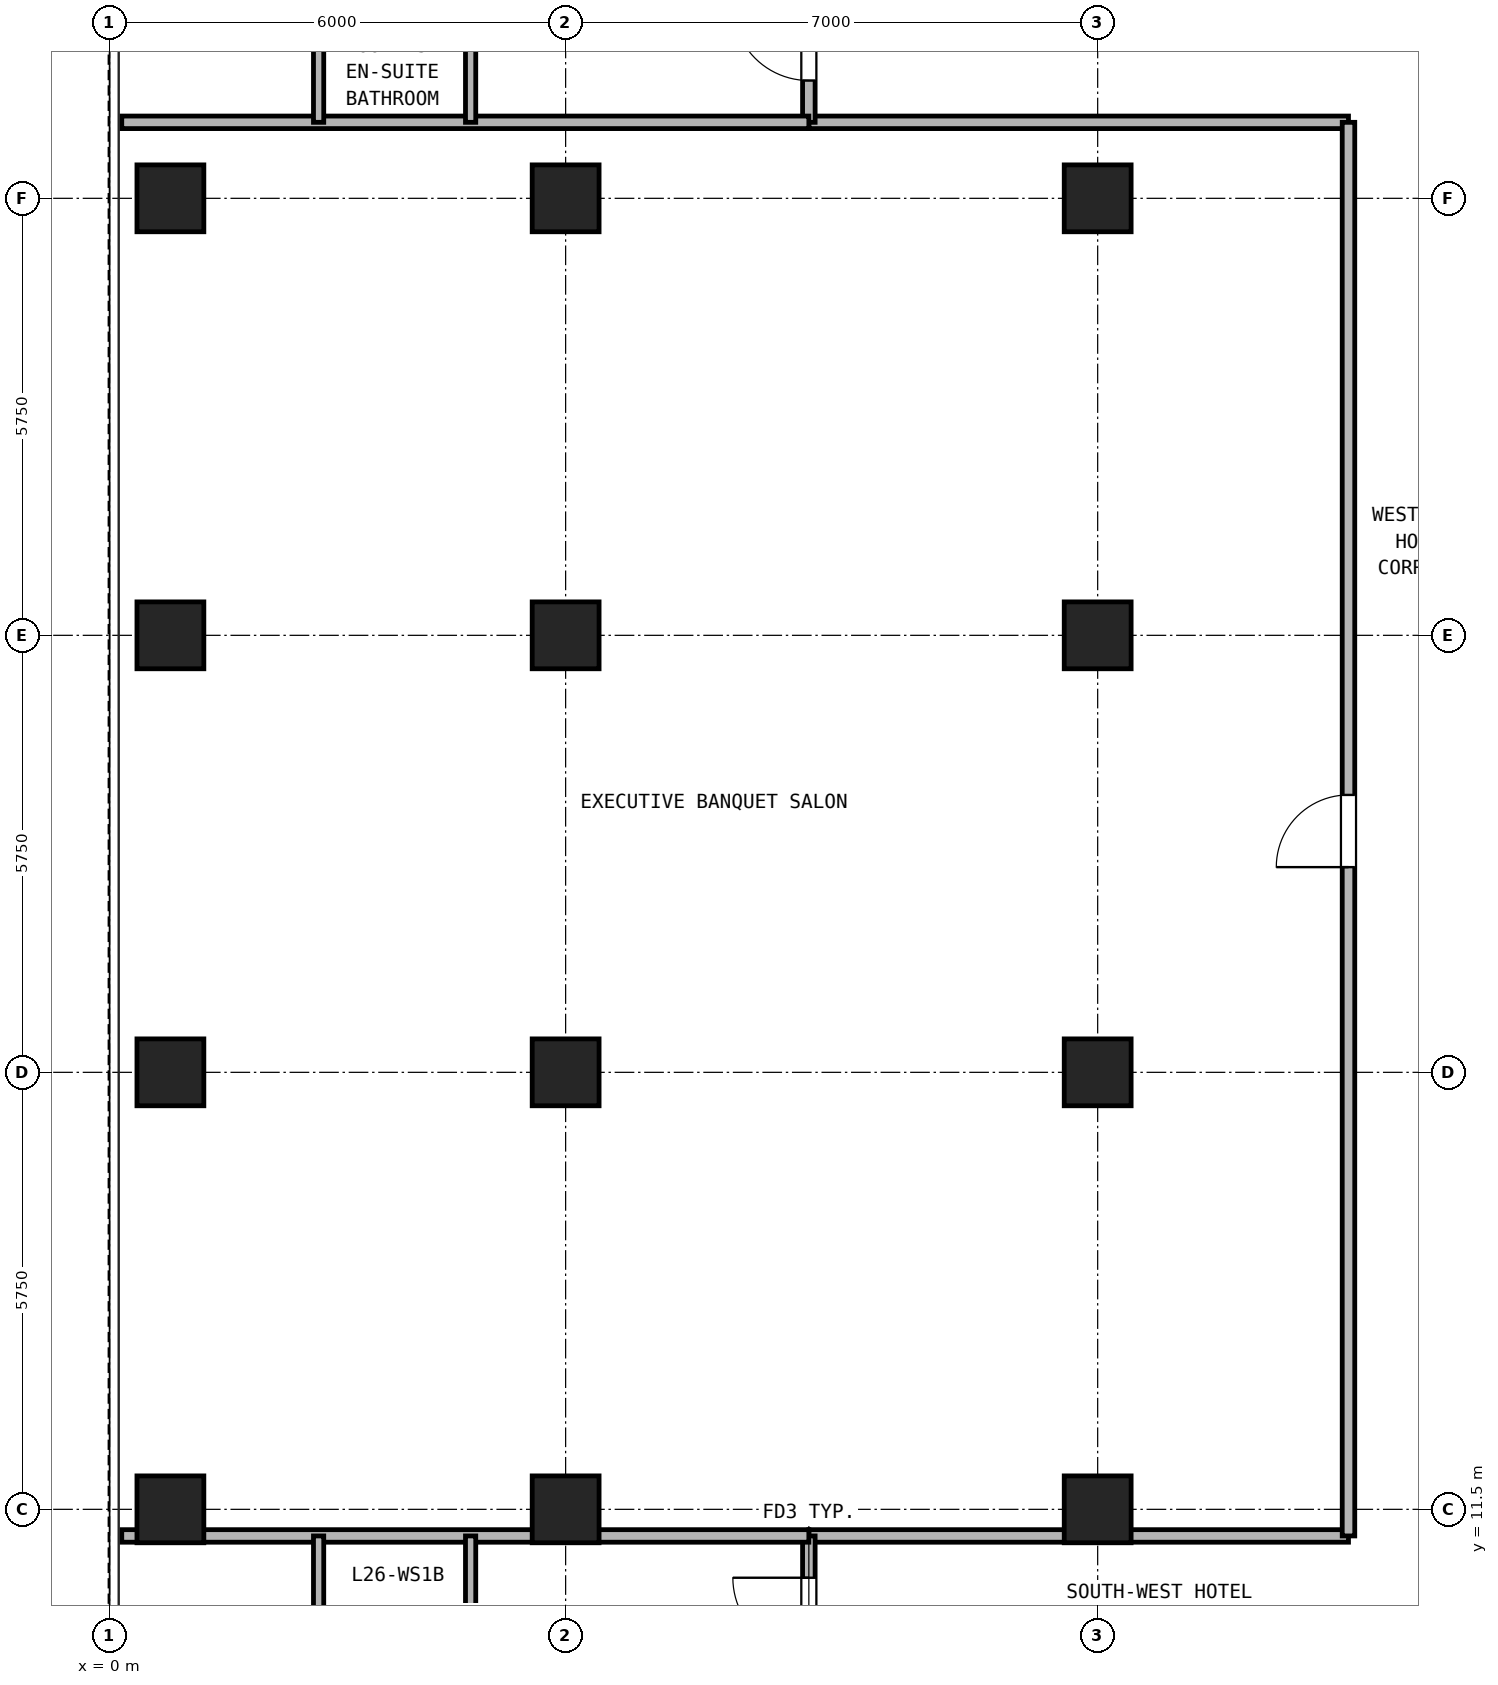
"""IFC4 building model, lengths in metres.
Left out: names, types, materials, properties, quantities, classifications, styles, units other than length and angle.
Written with IfcOpenShell. Run it as: python <this file> out.ifc"""

import sys

from ifc_helpers import new_model, si_unit, direction, frame, frame_2d, origin, origin_2d, place, context, subcontext, project, spatial, rectangle, hollow_rectangle, extrude, source, transform, mapped, element, fill, save


model = new_model("IFC4")
c1 = context("Model", 3, precision=1e-05, world=origin(), true_north=direction((0.0, 1.0)))
c2 = subcontext(c1, "Body", "Model", "MODEL_VIEW")
j1 = project(units=[si_unit("LENGTHUNIT", "METRE"), si_unit("PLANEANGLEUNIT", "RADIAN")], contexts=[c1])
p1 = place(None, origin())
s1 = spatial("IfcSite", under=j1, at=p1, CompositionType="ELEMENT")
p2 = place(p1, origin())
s2 = spatial("IfcBuilding", under=s1, at=p2, CompositionType="ELEMENT")
p3 = place(p2, frame((0.0, 0.0, 99.1)))
s3 = spatial("IfcBuildingStorey", under=s2, at=p3, CompositionType="ELEMENT", Elevation=99.1)
m1 = source(origin(), c2, "Body", "SweptSolid", [
    extrude(hollow_rectangle(XDim=0.88, YDim=0.88, WallThickness=0.05, at=origin_2d()), origin(), (0.0, 0.0, 1.0), 2.95),
])
for number, where, z_axis, x_axis in (
    (1, (0.8, 11.5, 0.0), (0.0, 0.0, 1.0), (1.0, 0.0, 0.0)),
    (2, (0.8, 17.25, 0.0), (0.0, 0.0, 1.0), (1.0, 0.0, 0.0)),
    (3, (0.8, 23.0, 0.0), (0.0, 0.0, 1.0), (1.0, 0.0, 0.0)),
    (4, (0.8, 28.75, 0.0), (0.0, 0.0, 1.0), (1.0, 0.0, 0.0)),
    (5, (6.0, 11.5, 0.0), (0.0, 0.0, 1.0), (1.0, 0.0, 0.0)),
    (6, (6.0, 17.25, 0.0), (0.0, 0.0, 1.0), (1.0, 0.0, 0.0)),
    (7, (6.0, 23.0, 0.0), (0.0, 0.0, 1.0), (1.0, 0.0, 0.0)),
    (8, (6.0, 28.75, 0.0), (0.0, 0.0, 1.0), (1.0, 0.0, 0.0)),
    (9, (13.0, 11.5, 0.0), (0.0, 0.0, 1.0), (1.0, 0.0, 0.0)),
    (10, (13.0, 17.25, 0.0), (0.0, 0.0, 1.0), (1.0, 0.0, 0.0)),
    (11, (13.0, 23.0, 0.0), (0.0, 0.0, 1.0), (1.0, 0.0, 0.0)),
    (12, (13.0, 28.75, 0.0), (0.0, 0.0, 1.0), (1.0, 0.0, 0.0)),
):
    element("IfcColumn", number, at=place(p3, frame(where, z_axis=z_axis, x_axis=x_axis)), inside=s3, PredefinedType="COLUMN", context=c2, shape_type="MappedRepresentation", body=[
        mapped(m1, transform((0.0, 0.0, 0.0), x_axis=(1.0, 0.0, 0.0), y_axis=(0.0, 1.0, 0.0), z_axis=(0.0, 0.0, 1.0), scale=1.0)),
    ])
for number, where, z_axis, x_axis in (
    (13, (9.2, 11.15, 0.0), (0.0, 0.0, 1.0), (1.0, 0.0, 0.0)),
    (14, (9.2, 29.75, 0.0), (0.0, 0.0, 1.0), (1.0, 0.0, 0.0)),
):
    element("IfcWall", number, at=place(p3, frame(where, z_axis=z_axis, x_axis=x_axis)), inside=s3, PredefinedType="PARTITIONING", context=c2, shape_type="SweptSolid", body=[
        extrude(rectangle(XDim=7.1, YDim=0.165, at=frame_2d((3.55, 0.0))), origin(), (0.0, 0.0, 1.0), 2.95),
    ])
p4 = place(p3, frame((16.3, 11.15, 0.0), z_axis=(0.0, 0.0, 1.0), x_axis=(0.0, 1.0, 0.0)))
e15 = element("IfcWall", 15, at=p4, inside=s3, PredefinedType="PARTITIONING", context=c2, shape_type="SweptSolid", body=[
    extrude(rectangle(XDim=18.6, YDim=0.165, at=frame_2d((9.3, 0.0))), origin(), (0.0, 0.0, 1.0), 2.95),
])
p5 = place(p4, frame((8.8, 0.0, 0.0)))
e16 = element("IfcOpeningElement", 16, at=p5, cuts=e15, PredefinedType="OPENING", context=c2, shape_type="SweptSolid", body=[
    extrude(rectangle(XDim=0.95, YDim=2.15, at=frame_2d((0.475, 1.075))), frame((0.0, 0.093, 0.0), z_axis=(0.0, -1.0, 0.0), x_axis=(1.0, 0.0, 0.0)), (0.0, 0.0, 1.0), 0.185),
])
p6 = place(p3, frame((9.2, 0.16, 0.0), z_axis=(0.0, 0.0, 1.0), x_axis=(0.0, 1.0, 0.0)))
e17 = element("IfcWall", 17, at=p6, inside=s3, PredefinedType="PARTITIONING", context=c2, shape_type="SweptSolid", body=[
    extrude(rectangle(XDim=10.99, YDim=0.165, at=frame_2d((5.495, 0.0))), origin(), (0.0, 0.0, 1.0), 2.95),
])
p7 = place(p6, frame((9.44, 0.0, 0.0)))
e18 = element("IfcOpeningElement", 18, at=p7, cuts=e17, PredefinedType="OPENING", context=c2, shape_type="SweptSolid", body=[
    extrude(rectangle(XDim=1.0, YDim=2.15, at=frame_2d((0.5, 1.075))), frame((0.0, 0.093, 0.0), z_axis=(0.0, -1.0, 0.0), x_axis=(1.0, 0.0, 0.0)), (0.0, 0.0, 1.0), 0.185),
])
p8 = place(p3, frame((9.2, 29.75, 0.0), z_axis=(0.0, 0.0, 1.0), x_axis=(0.0, 1.0, 0.0)))
e19 = element("IfcWall", 19, at=p8, inside=s3, PredefinedType="PARTITIONING", context=c2, shape_type="SweptSolid", body=[
    extrude(rectangle(XDim=5.39, YDim=0.165, at=frame_2d((2.695, 0.0))), origin(), (0.0, 0.0, 1.0), 2.95),
])
p9 = place(p8, frame((0.55, 0.0, 0.0)))
e20 = element("IfcOpeningElement", 20, at=p9, cuts=e19, PredefinedType="OPENING", context=c2, shape_type="SweptSolid", body=[
    extrude(rectangle(XDim=1.0, YDim=2.15, at=frame_2d((0.5, 1.075))), frame((0.0, 0.093, 0.0), z_axis=(0.0, -1.0, 0.0), x_axis=(1.0, 0.0, 0.0)), (0.0, 0.0, 1.0), 0.185),
])
for number, where, z_axis, x_axis in (
    (21, (0.16, 11.15, 0.0), (0.0, 0.0, 1.0), (1.0, 0.0, 0.0)),
    (22, (0.16, 29.75, 0.0), (0.0, 0.0, 1.0), (1.0, 0.0, 0.0)),
):
    element("IfcWall", number, at=place(p3, frame(where, z_axis=z_axis, x_axis=x_axis)), inside=s3, PredefinedType="PARTITIONING", context=c2, shape_type="SweptSolid", body=[
        extrude(rectangle(XDim=9.04, YDim=0.165, at=frame_2d((4.52, 0.0))), origin(), (0.0, 0.0, 1.0), 2.95),
    ])
for number, where, z_axis, x_axis in (
    (23, (2.75, 9.05, 0.0), (0.0, 0.0, 1.0), (0.0, 1.0, 0.0)),
    (24, (4.75, 9.05, 0.0), (0.0, 0.0, 1.0), (0.0, 1.0, 0.0)),
):
    element("IfcWall", number, at=place(p3, frame(where, z_axis=z_axis, x_axis=x_axis)), inside=s3, PredefinedType="PARTITIONING", context=c2, shape_type="SweptSolid", body=[
        extrude(rectangle(XDim=2.1, YDim=0.135, at=frame_2d((1.05, 0.0))), origin(), (0.0, 0.0, 1.0), 2.95),
    ])
for number, where, z_axis, x_axis in (
    (25, (2.75, 29.75, 0.0), (0.0, 0.0, 1.0), (0.0, 1.0, 0.0)),
    (26, (4.75, 29.75, 0.0), (0.0, 0.0, 1.0), (0.0, 1.0, 0.0)),
):
    element("IfcWall", number, at=place(p3, frame(where, z_axis=z_axis, x_axis=x_axis)), inside=s3, PredefinedType="PARTITIONING", context=c2, shape_type="SweptSolid", body=[
        extrude(rectangle(XDim=2.1, YDim=0.135, at=frame_2d((1.05, 0.0))), origin(), (0.0, 0.0, 1.0), 2.95),
    ])
p10 = place(p7, origin())
e27 = element("IfcDoor", 27, at=p10, inside=s3, OperationType="SINGLE_SWING_RIGHT", PredefinedType="DOOR", context=c2, shape_type="SweptSolid", body=[
    extrude(rectangle(XDim=1.0, YDim=2.15, at=frame_2d((0.5, 1.075))), frame((0.0, 0.025, 0.0), z_axis=(0.0, -1.0, 0.0), x_axis=(1.0, 0.0, 0.0)), (0.0, 0.0, 1.0), 0.05),
])
fill(e18, e27)
p11 = place(p9, origin())
e28 = element("IfcDoor", 28, at=p11, inside=s3, OperationType="SINGLE_SWING_RIGHT", PredefinedType="DOOR", context=c2, shape_type="SweptSolid", body=[
    extrude(rectangle(XDim=1.0, YDim=2.15, at=frame_2d((0.5, 1.075))), frame((0.0, 0.025, 0.0), z_axis=(0.0, -1.0, 0.0), x_axis=(1.0, 0.0, 0.0)), (0.0, 0.0, 1.0), 0.05),
])
fill(e20, e28)
p12 = place(p5, frame((0.95, 0.0, 0.0), z_axis=(0.0, 0.0, 1.0), x_axis=(-1.0, 0.0, 0.0)))
e29 = element("IfcDoor", 29, at=p12, inside=s3, OperationType="SINGLE_SWING_LEFT", PredefinedType="DOOR", context=c2, shape_type="SweptSolid", body=[
    extrude(rectangle(XDim=0.95, YDim=2.15, at=frame_2d((0.475, 1.075))), frame((0.0, 0.025, 0.0), z_axis=(0.0, -1.0, 0.0), x_axis=(1.0, 0.0, 0.0)), (0.0, 0.0, 1.0), 0.05),
])
fill(e16, e29)
save(model, sys.argv[1])
